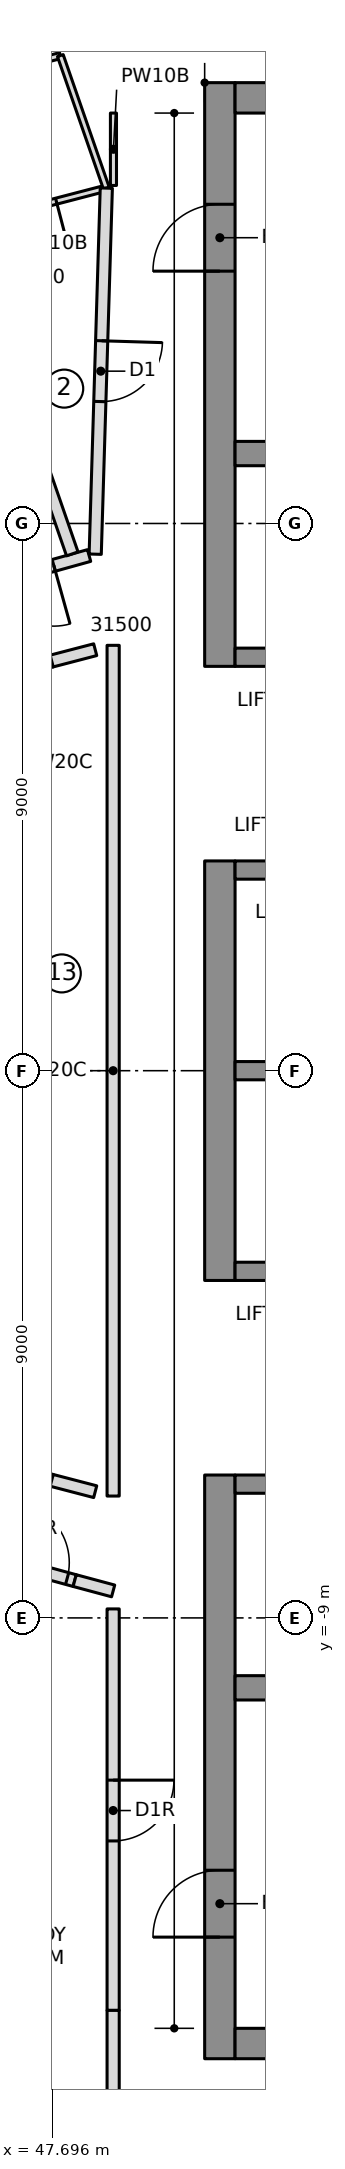
"""IFC4 building model, lengths in metres.
Left out: names, types, materials, properties, quantities, classifications, styles, units other than length and angle.
Written with IfcOpenShell. Run it as: python <this file> out.ifc"""

import sys

from ifc_helpers import new_model, si_unit, direction, frame, frame_2d, origin, place, context, subcontext, project, spatial, rectangle, extrude, element, fill, save


model = new_model("IFC4")
c1 = context("Model", 3, precision=1e-05, world=origin(), true_north=direction((0.0, 1.0)))
c2 = subcontext(c1, "Body", "Model", "MODEL_VIEW")
j1 = project(units=[si_unit("LENGTHUNIT", "METRE"), si_unit("PLANEANGLEUNIT", "RADIAN")], contexts=[c1])
p1 = place(None, origin())
s1 = spatial("IfcSite", under=j1, at=p1, CompositionType="ELEMENT")
p2 = place(p1, origin())
s2 = spatial("IfcBuilding", under=s1, at=p2, CompositionType="ELEMENT")
p3 = place(p2, frame((0.0, 0.0, 296.3)))
s3 = spatial("IfcBuildingStorey", under=s2, at=p3, CompositionType="ELEMENT", Elevation=296.3)
p4 = place(p3, frame((50.45, 6.65, 0.0), z_axis=(0.0, 0.0, 1.0), x_axis=(0.0, 1.0, 0.0)))
e1 = element("IfcWall", 1, at=p4, inside=s3, PredefinedType="SHEAR", context=c2, shape_type="SweptSolid", body=[
    extrude(rectangle(XDim=9.6, YDim=0.5, at=frame_2d((4.8, 0.0))), origin(), (0.0, 0.0, 1.0), 3.55),
])
p5 = place(p4, frame((6.5, 0.0, 0.0)))
e2 = element("IfcOpeningElement", 2, at=p5, cuts=e1, PredefinedType="OPENING", context=c2, shape_type="SweptSolid", body=[
    extrude(rectangle(XDim=1.1, YDim=2.1, at=frame_2d((0.55, 1.05))), frame((0.0, 0.26, 0.0), z_axis=(0.0, -1.0, 0.0), x_axis=(1.0, 0.0, 0.0)), (0.0, 0.0, 1.0), 0.52),
])
p6 = place(p3, frame((50.45, -3.45, 0.0), z_axis=(0.0, 0.0, 1.0), x_axis=(0.0, 1.0, 0.0)))
e3 = element("IfcWall", 3, at=p6, inside=s3, PredefinedType="SHEAR", context=c2, shape_type="SweptSolid", body=[
    extrude(rectangle(XDim=6.9, YDim=0.5, at=frame_2d((3.45, 0.0))), origin(), (0.0, 0.0, 1.0), 3.55),
])
p7 = place(p3, frame((50.45, -16.25, 0.0), z_axis=(0.0, 0.0, 1.0), x_axis=(0.0, 1.0, 0.0)))
e4 = element("IfcWall", 4, at=p7, inside=s3, PredefinedType="SHEAR", context=c2, shape_type="SweptSolid", body=[
    extrude(rectangle(XDim=9.6, YDim=0.5, at=frame_2d((4.8, 0.0))), origin(), (0.0, 0.0, 1.0), 3.55),
])
p8 = place(p7, frame((2.0, 0.0, 0.0)))
e5 = element("IfcOpeningElement", 5, at=p8, cuts=e4, PredefinedType="OPENING", context=c2, shape_type="SweptSolid", body=[
    extrude(rectangle(XDim=1.1, YDim=2.1, at=frame_2d((0.55, 1.05))), frame((0.0, 0.26, 0.0), z_axis=(0.0, -1.0, 0.0), x_axis=(1.0, 0.0, 0.0)), (0.0, 0.0, 1.0), 0.52),
])
for number, where, z_axis, x_axis in (
    (6, (50.7, 16.0, 0.0), (0.0, 0.0, 1.0), (1.0, 0.0, 0.0)),
    (7, (50.7, -16.0, 0.0), (0.0, 0.0, 1.0), (1.0, 0.0, 0.0)),
):
    element("IfcWall", number, at=place(p3, frame(where, z_axis=z_axis, x_axis=x_axis)), inside=s3, PredefinedType="SHEAR", context=c2, shape_type="SweptSolid", body=[
        extrude(rectangle(XDim=13.52, YDim=0.5, at=frame_2d((6.76, 0.0))), origin(), (0.0, 0.0, 1.0), 3.55),
    ])
p9 = place(p3, frame((50.7, 10.15, 0.0), z_axis=(0.0, 0.0, 1.0), x_axis=(1.0, 0.0, 0.0)))
e8 = element("IfcWall", 8, at=p9, inside=s3, PredefinedType="SHEAR", context=c2, shape_type="SweptSolid", body=[
    extrude(rectangle(XDim=13.02, YDim=0.4, at=frame_2d((6.51, 0.0))), origin(), (0.0, 0.0, 1.0), 3.55),
])
p10 = place(p9, frame((0.7, 0.0, 0.0)))
e9 = element("IfcOpeningElement", 9, at=p10, cuts=e8, PredefinedType="OPENING", context=c2, shape_type="SweptSolid", body=[
    extrude(rectangle(XDim=1.1, YDim=2.1, at=frame_2d((0.55, 1.05))), frame((0.0, 0.21, 0.0), z_axis=(0.0, -1.0, 0.0), x_axis=(1.0, 0.0, 0.0)), (0.0, 0.0, 1.0), 0.42),
])
p11 = place(p9, frame((3.5, 0.0, 0.0)))
e10 = element("IfcOpeningElement", 10, at=p11, cuts=e8, PredefinedType="OPENING", context=c2, shape_type="SweptSolid", body=[
    extrude(rectangle(XDim=1.1, YDim=2.1, at=frame_2d((0.55, 1.05))), frame((0.0, 0.21, 0.0), z_axis=(0.0, -1.0, 0.0), x_axis=(1.0, 0.0, 0.0)), (0.0, 0.0, 1.0), 0.42),
])
p12 = place(p3, frame((50.7, -10.15, 0.0), z_axis=(0.0, 0.0, 1.0), x_axis=(1.0, 0.0, 0.0)))
e11 = element("IfcWall", 11, at=p12, inside=s3, PredefinedType="SHEAR", context=c2, shape_type="SweptSolid", body=[
    extrude(rectangle(XDim=13.02, YDim=0.4, at=frame_2d((6.51, 0.0))), origin(), (0.0, 0.0, 1.0), 3.55),
])
p13 = place(p3, frame((50.7, 0.0, 0.0), z_axis=(0.0, 0.0, 1.0), x_axis=(1.0, 0.0, 0.0)))
e12 = element("IfcWall", 12, at=p13, inside=s3, PredefinedType="SHEAR", context=c2, shape_type="SweptSolid", body=[
    extrude(rectangle(XDim=10.9, YDim=0.3, at=frame_2d((5.45, 0.0))), origin(), (0.0, 0.0, 1.0), 3.55),
])
p14 = place(p3, frame((50.7, 3.3, 0.0), z_axis=(0.0, 0.0, 1.0), x_axis=(1.0, 0.0, 0.0)))
e13 = element("IfcWall", 13, at=p14, inside=s3, PredefinedType="SHEAR", context=c2, shape_type="SweptSolid", body=[
    extrude(rectangle(XDim=10.9, YDim=0.3, at=frame_2d((5.45, 0.0))), origin(), (0.0, 0.0, 1.0), 3.55),
])
p15 = place(p14, frame((0.7, 0.0, 0.0)))
e14 = element("IfcOpeningElement", 14, at=p15, cuts=e13, PredefinedType="OPENING", context=c2, shape_type="SweptSolid", body=[
    extrude(rectangle(XDim=1.1, YDim=2.1, at=frame_2d((0.55, 1.05))), frame((0.0, 0.16, 0.0), z_axis=(0.0, -1.0, 0.0), x_axis=(1.0, 0.0, 0.0)), (0.0, 0.0, 1.0), 0.32),
])
p16 = place(p14, frame((3.5, 0.0, 0.0)))
e15 = element("IfcOpeningElement", 15, at=p16, cuts=e13, PredefinedType="OPENING", context=c2, shape_type="SweptSolid", body=[
    extrude(rectangle(XDim=1.1, YDim=2.1, at=frame_2d((0.55, 1.05))), frame((0.0, 0.16, 0.0), z_axis=(0.0, -1.0, 0.0), x_axis=(1.0, 0.0, 0.0)), (0.0, 0.0, 1.0), 0.32),
])
p17 = place(p14, frame((6.4, 0.0, 0.0)))
e16 = element("IfcOpeningElement", 16, at=p17, cuts=e13, PredefinedType="OPENING", context=c2, shape_type="SweptSolid", body=[
    extrude(rectangle(XDim=0.9, YDim=2.1, at=frame_2d((0.45, 1.05))), frame((0.0, 0.16, 0.0), z_axis=(0.0, -1.0, 0.0), x_axis=(1.0, 0.0, 0.0)), (0.0, 0.0, 1.0), 0.32),
])
p18 = place(p14, frame((9.2, 0.0, 0.0)))
e17 = element("IfcOpeningElement", 17, at=p18, cuts=e13, PredefinedType="OPENING", context=c2, shape_type="SweptSolid", body=[
    extrude(rectangle(XDim=0.9, YDim=2.1, at=frame_2d((0.45, 1.05))), frame((0.0, 0.16, 0.0), z_axis=(0.0, -1.0, 0.0), x_axis=(1.0, 0.0, 0.0)), (0.0, 0.0, 1.0), 0.32),
])
p19 = place(p3, frame((50.7, 6.8, 0.0), z_axis=(0.0, 0.0, 1.0), x_axis=(1.0, 0.0, 0.0)))
e18 = element("IfcWall", 18, at=p19, inside=s3, PredefinedType="SHEAR", context=c2, shape_type="SweptSolid", body=[
    extrude(rectangle(XDim=10.9, YDim=0.3, at=frame_2d((5.45, 0.0))), origin(), (0.0, 0.0, 1.0), 3.55),
])
p20 = place(p19, frame((6.4, 0.0, 0.0)))
e19 = element("IfcOpeningElement", 19, at=p20, cuts=e18, PredefinedType="OPENING", context=c2, shape_type="SweptSolid", body=[
    extrude(rectangle(XDim=0.9, YDim=2.1, at=frame_2d((0.45, 1.05))), frame((0.0, 0.16, 0.0), z_axis=(0.0, -1.0, 0.0), x_axis=(1.0, 0.0, 0.0)), (0.0, 0.0, 1.0), 0.32),
])
p21 = place(p19, frame((9.2, 0.0, 0.0)))
e20 = element("IfcOpeningElement", 20, at=p21, cuts=e18, PredefinedType="OPENING", context=c2, shape_type="SweptSolid", body=[
    extrude(rectangle(XDim=0.9, YDim=2.1, at=frame_2d((0.45, 1.05))), frame((0.0, 0.16, 0.0), z_axis=(0.0, -1.0, 0.0), x_axis=(1.0, 0.0, 0.0)), (0.0, 0.0, 1.0), 0.32),
])
p22 = place(p3, frame((50.7, -3.3, 0.0), z_axis=(0.0, 0.0, 1.0), x_axis=(1.0, 0.0, 0.0)))
e21 = element("IfcWall", 21, at=p22, inside=s3, PredefinedType="SHEAR", context=c2, shape_type="SweptSolid", body=[
    extrude(rectangle(XDim=10.9, YDim=0.3, at=frame_2d((5.45, 0.0))), origin(), (0.0, 0.0, 1.0), 3.55),
])
p23 = place(p22, frame((9.1, 0.0, 0.0)))
e22 = element("IfcOpeningElement", 22, at=p23, cuts=e21, PredefinedType="OPENING", context=c2, shape_type="SweptSolid", body=[
    extrude(rectangle(XDim=1.1, YDim=2.1, at=frame_2d((0.55, 1.05))), frame((0.0, 0.16, 0.0), z_axis=(0.0, -1.0, 0.0), x_axis=(1.0, 0.0, 0.0)), (0.0, 0.0, 1.0), 0.32),
])
p24 = place(p3, frame((50.7, -6.8, 0.0), z_axis=(0.0, 0.0, 1.0), x_axis=(1.0, 0.0, 0.0)))
e23 = element("IfcWall", 23, at=p24, inside=s3, PredefinedType="SHEAR", context=c2, shape_type="SweptSolid", body=[
    extrude(rectangle(XDim=10.9, YDim=0.3, at=frame_2d((5.45, 0.0))), origin(), (0.0, 0.0, 1.0), 3.55),
])
p25 = place(p24, frame((6.3, 0.0, 0.0)))
e24 = element("IfcOpeningElement", 24, at=p25, cuts=e23, PredefinedType="OPENING", context=c2, shape_type="SweptSolid", body=[
    extrude(rectangle(XDim=1.1, YDim=2.1, at=frame_2d((0.55, 1.05))), frame((0.0, 0.16, 0.0), z_axis=(0.0, -1.0, 0.0), x_axis=(1.0, 0.0, 0.0)), (0.0, 0.0, 1.0), 0.32),
])
p26 = place(p24, frame((9.1, 0.0, 0.0)))
e25 = element("IfcOpeningElement", 25, at=p26, cuts=e23, PredefinedType="OPENING", context=c2, shape_type="SweptSolid", body=[
    extrude(rectangle(XDim=1.1, YDim=2.1, at=frame_2d((0.55, 1.05))), frame((0.0, 0.16, 0.0), z_axis=(0.0, -1.0, 0.0), x_axis=(1.0, 0.0, 0.0)), (0.0, 0.0, 1.0), 0.32),
])
p27 = place(p24, frame((0.8, 0.0, 0.0)))
e26 = element("IfcOpeningElement", 26, at=p27, cuts=e23, PredefinedType="OPENING", context=c2, shape_type="SweptSolid", body=[
    extrude(rectangle(XDim=0.9, YDim=2.1, at=frame_2d((0.45, 1.05))), frame((0.0, 0.16, 0.0), z_axis=(0.0, -1.0, 0.0), x_axis=(1.0, 0.0, 0.0)), (0.0, 0.0, 1.0), 0.32),
])
p28 = place(p24, frame((3.6, 0.0, 0.0)))
e27 = element("IfcOpeningElement", 27, at=p28, cuts=e23, PredefinedType="OPENING", context=c2, shape_type="SweptSolid", body=[
    extrude(rectangle(XDim=0.9, YDim=2.1, at=frame_2d((0.45, 1.05))), frame((0.0, 0.16, 0.0), z_axis=(0.0, -1.0, 0.0), x_axis=(1.0, 0.0, 0.0)), (0.0, 0.0, 1.0), 0.32),
])
p29 = place(p3, frame((48.299, 8.473, 0.0), z_axis=(0.0, 0.0, 1.0), x_axis=(-0.96343417102, -0.267945140115, 0.0)))
e28 = element("IfcWall", 28, at=p29, inside=s3, PredefinedType="PARTITIONING", context=c2, shape_type="SweptSolid", body=[
    extrude(rectangle(XDim=4.43, YDim=0.2, at=frame_2d((2.215, 0.0))), origin(), (0.0, 0.0, 1.0), 3.25),
])
p30 = place(p29, frame((0.603, 0.0, 0.0)))
e29 = element("IfcOpeningElement", 29, at=p30, cuts=e28, PredefinedType="OPENING", context=c2, shape_type="SweptSolid", body=[
    extrude(rectangle(XDim=1.0, YDim=2.1, at=frame_2d((0.5, 1.05))), frame((0.0, 0.11, 0.0), z_axis=(0.0, -1.0, 0.0), x_axis=(1.0, 0.0, 0.0)), (0.0, 0.0, 1.0), 0.22),
])
p31 = place(p3, frame((48.023, 8.5, 0.0), z_axis=(0.0, 0.0, 1.0), x_axis=(-0.327705598625, 0.944779890043, 0.0)))
e30 = element("IfcWall", 30, at=p31, inside=s3, PredefinedType="PARTITIONING", context=c2, shape_type="SweptSolid", body=[
    extrude(rectangle(XDim=9.61, YDim=0.2, at=frame_2d((4.805, 0.0))), origin(), (0.0, 0.0, 1.0), 3.25),
])
p32 = place(p3, frame((48.583, 14.516, 0.0), z_axis=(0.0, 0.0, 1.0), x_axis=(-0.967665843663, -0.252235633897, 0.0)))
e31 = element("IfcWall", 31, at=p32, inside=s3, PredefinedType="PARTITIONING", context=c2, shape_type="SweptSolid", body=[
    extrude(rectangle(XDim=2.508, YDim=0.1, at=frame_2d((1.254, 0.0))), origin(), (0.0, 0.0, 1.0), 3.25),
])
p33 = place(p32, frame((0.85, 0.0, 0.0)))
e32 = element("IfcOpeningElement", 32, at=p33, cuts=e31, PredefinedType="OPENING", context=c2, shape_type="SweptSolid", body=[
    extrude(rectangle(XDim=0.8, YDim=2.1, at=frame_2d((0.4, 1.05))), frame((0.0, 0.06, 0.0), z_axis=(0.0, -1.0, 0.0), x_axis=(1.0, 0.0, 0.0)), (0.0, 0.0, 1.0), 0.12),
])
p34 = place(p3, frame((45.955, 16.208, 0.0), z_axis=(0.0, 0.0, 1.0), x_axis=(0.967650770907, 0.25229345129, 0.0)))
e33 = element("IfcWall", 33, at=p34, inside=s3, PredefinedType="PARTITIONING", context=c2, shape_type="SweptSolid", body=[
    extrude(rectangle(XDim=1.934, YDim=0.1, at=frame_2d((0.967, 0.0))), origin(), (0.0, 0.0, 1.0), 3.25),
])
p35 = place(p3, frame((47.826, 16.696, 0.0), z_axis=(0.0, 0.0, 1.0), x_axis=(0.327695604762, -0.944783356447, 0.0)))
e34 = element("IfcWall", 34, at=p35, inside=s3, PredefinedType="PARTITIONING", context=c2, shape_type="SweptSolid", body=[
    extrude(rectangle(XDim=2.307, YDim=0.1, at=frame_2d((1.154, 0.0))), origin(), (0.0, 0.0, 1.0), 3.25),
])
p36 = place(p3, frame((44.031, -7.286, 0.0), z_axis=(0.0, 0.0, 1.0), x_axis=(0.964708521199, -0.263320088726, 0.0)))
e35 = element("IfcWall", 35, at=p36, inside=s3, PredefinedType="PARTITIONING", context=c2, shape_type="SweptSolid", body=[
    extrude(rectangle(XDim=4.179, YDim=0.2, at=frame_2d((2.089, 0.0))), origin(), (0.0, 0.0, 1.0), 3.25),
])
p37 = place(p36, frame((3.05, 0.0, 0.0)))
e36 = element("IfcOpeningElement", 36, at=p37, cuts=e35, PredefinedType="OPENING", context=c2, shape_type="SweptSolid", body=[
    extrude(rectangle(XDim=1.0, YDim=2.1, at=frame_2d((0.5, 1.05))), frame((0.0, 0.11, 0.0), z_axis=(0.0, -1.0, 0.0), x_axis=(1.0, 0.0, 0.0)), (0.0, 0.0, 1.0), 0.22),
])
p38 = place(p3, frame((43.918, 5.675, 0.0), z_axis=(0.0, 0.0, 1.0), x_axis=(0.962411212211, 0.271596499628, 0.0)))
e37 = element("IfcWall", 37, at=p38, inside=s3, PredefinedType="PARTITIONING", context=c2, shape_type="SweptSolid", body=[
    extrude(rectangle(XDim=3.913, YDim=0.2, at=frame_2d((1.957, 0.0))), origin(), (0.0, 0.0, 1.0), 3.25),
])
p39 = place(p38, frame((1.457, 0.0, 0.0)))
e38 = element("IfcOpeningElement", 38, at=p39, cuts=e37, PredefinedType="OPENING", context=c2, shape_type="SweptSolid", body=[
    extrude(rectangle(XDim=1.5, YDim=2.1, at=frame_2d((0.75, 1.05))), frame((0.0, 0.11, 0.0), z_axis=(0.0, -1.0, 0.0), x_axis=(1.0, 0.0, 0.0)), (0.0, 0.0, 1.0), 0.22),
])
p40 = place(p3, frame((47.684, -6.738, 0.0), z_axis=(0.0, 0.0, 1.0), x_axis=(-0.962411212211, 0.271596499628, 0.0)))
e39 = element("IfcWall", 39, at=p40, inside=s3, PredefinedType="PARTITIONING", context=c2, shape_type="SweptSolid", body=[
    extrude(rectangle(XDim=3.913, YDim=0.2, at=frame_2d((1.957, 0.0))), origin(), (0.0, 0.0, 1.0), 3.25),
])
for number, where, z_axis, x_axis in (
    (40, (47.684, 6.738, 0.0), (0.0, 0.0, 1.0), (0.968, 0.253, 0.0)),
    (41, (48.4, -6.924, 0.0), (0.0, 0.0, 1.0), (-0.968, 0.253, 0.0)),
):
    element("IfcWall", number, at=place(p3, frame(where, z_axis=z_axis, x_axis=x_axis)), inside=s3, PredefinedType="PARTITIONING", context=c2, shape_type="SweptSolid", body=[
        extrude(rectangle(XDim=0.74, YDim=0.2, at=frame_2d((0.37, 0.0))), origin(), (0.0, 0.0, 1.0), 3.25),
    ])
p41 = place(p3, frame((48.695, -8.852, 0.0), z_axis=(0.0, 0.0, 1.0), x_axis=(0.0, -1.0, 0.0)))
e42 = element("IfcWall", 42, at=p41, inside=s3, PredefinedType="PARTITIONING", context=c2, shape_type="SweptSolid", body=[
    extrude(rectangle(XDim=6.603, YDim=0.2, at=frame_2d((3.302, 0.0))), origin(), (0.0, 0.0, 1.0), 3.25),
])
p42 = place(p41, frame((2.816, 0.0, 0.0)))
e43 = element("IfcOpeningElement", 43, at=p42, cuts=e42, PredefinedType="OPENING", context=c2, shape_type="SweptSolid", body=[
    extrude(rectangle(XDim=1.0, YDim=2.1, at=frame_2d((0.5, 1.05))), frame((0.0, 0.11, 0.0), z_axis=(0.0, -1.0, 0.0), x_axis=(1.0, 0.0, 0.0)), (0.0, 0.0, 1.0), 0.22),
])
p43 = place(p3, frame((48.583, 14.516, 0.0), z_axis=(0.0, 0.0, 1.0), x_axis=(-0.030318578026, -0.999540286245, 0.0)))
e44 = element("IfcWall", 44, at=p43, inside=s3, PredefinedType="PARTITIONING", context=c2, shape_type="SweptSolid", body=[
    extrude(rectangle(XDim=6.023, YDim=0.2, at=frame_2d((3.012, 0.0))), origin(), (0.0, 0.0, 1.0), 3.25),
])
p44 = place(p43, frame((2.512, 0.0, 0.0)))
e45 = element("IfcOpeningElement", 45, at=p44, cuts=e44, PredefinedType="OPENING", context=c2, shape_type="SweptSolid", body=[
    extrude(rectangle(XDim=1.0, YDim=2.1, at=frame_2d((0.5, 1.05))), frame((0.0, 0.11, 0.0), z_axis=(0.0, -1.0, 0.0), x_axis=(1.0, 0.0, 0.0)), (0.0, 0.0, 1.0), 0.22),
])
p45 = place(p3, frame((48.695, 6.996, 0.0), z_axis=(0.0, 0.0, 1.0), x_axis=(0.0, -1.0, 0.0)))
e46 = element("IfcWall", 46, at=p45, inside=s3, PredefinedType="PARTITIONING", context=c2, shape_type="SweptSolid", body=[
    extrude(rectangle(XDim=13.992, YDim=0.2, at=frame_2d((6.996, 0.0))), origin(), (0.0, 0.0, 1.0), 3.25),
])
p46 = place(p3, frame((48.062, -8.386, 0.0), z_axis=(0.0, 0.0, 1.0), x_axis=(0.965669715173, -0.259772980114, 0.0)))
e47 = element("IfcWall", 47, at=p46, inside=s3, PredefinedType="PARTITIONING", context=c2, shape_type="SweptSolid", body=[
    extrude(rectangle(XDim=0.655, YDim=0.2, at=frame_2d((0.328, 0.0))), origin(), (0.0, 0.0, 1.0), 3.25),
])
p47 = place(p3, frame((48.695, -15.455, 0.0), z_axis=(0.0, 0.0, 1.0), x_axis=(0.0, -1.0, 0.0)))
e48 = element("IfcWall", 48, at=p47, inside=s3, PredefinedType="PARTITIONING", context=c2, shape_type="SweptSolid", body=[
    extrude(rectangle(XDim=3.098, YDim=0.2, at=frame_2d((1.549, 0.0))), origin(), (0.0, 0.0, 1.0), 3.25),
])
p48 = place(p3, frame((48.7, 14.559, 0.0), z_axis=(0.0, 0.0, 1.0), x_axis=(0.0, 1.0, 0.0)))
e49 = element("IfcWall", 49, at=p48, inside=s3, PredefinedType="PARTITIONING", context=c2, shape_type="SweptSolid", body=[
    extrude(rectangle(XDim=1.191, YDim=0.1, at=frame_2d((0.595, 0.0))), origin(), (0.0, 0.0, 1.0), 3.25),
])
p49 = place(p30, origin())
e50 = element("IfcDoor", 50, at=p49, inside=s3, OperationType="SINGLE_SWING_LEFT", PredefinedType="DOOR", context=c2, shape_type="SweptSolid", body=[
    extrude(rectangle(XDim=1.0, YDim=2.1, at=frame_2d((0.5, 1.05))), frame((0.0, 0.025, 0.0), z_axis=(0.0, -1.0, 0.0), x_axis=(1.0, 0.0, 0.0)), (0.0, 0.0, 1.0), 0.05),
])
fill(e29, e50)
p50 = place(p33, origin())
e51 = element("IfcDoor", 51, at=p50, inside=s3, OperationType="SINGLE_SWING_LEFT", PredefinedType="DOOR", context=c2, shape_type="SweptSolid", body=[
    extrude(rectangle(XDim=0.8, YDim=2.1, at=frame_2d((0.4, 1.05))), frame((0.0, 0.025, 0.0), z_axis=(0.0, -1.0, 0.0), x_axis=(1.0, 0.0, 0.0)), (0.0, 0.0, 1.0), 0.05),
])
fill(e32, e51)
p51 = place(p37, origin())
e52 = element("IfcDoor", 52, at=p51, inside=s3, OperationType="SINGLE_SWING_RIGHT", PredefinedType="DOOR", context=c2, shape_type="SweptSolid", body=[
    extrude(rectangle(XDim=1.0, YDim=2.1, at=frame_2d((0.5, 1.05))), frame((0.0, 0.025, 0.0), z_axis=(0.0, -1.0, 0.0), x_axis=(1.0, 0.0, 0.0)), (0.0, 0.0, 1.0), 0.05),
])
fill(e36, e52)
p52 = place(p42, origin())
e53 = element("IfcDoor", 53, at=p52, inside=s3, OperationType="SINGLE_SWING_RIGHT", PredefinedType="DOOR", context=c2, shape_type="SweptSolid", body=[
    extrude(rectangle(XDim=1.0, YDim=2.1, at=frame_2d((0.5, 1.05))), frame((0.0, 0.025, 0.0), z_axis=(0.0, -1.0, 0.0), x_axis=(1.0, 0.0, 0.0)), (0.0, 0.0, 1.0), 0.05),
])
fill(e43, e53)
p53 = place(p44, origin())
e54 = element("IfcDoor", 54, at=p53, inside=s3, OperationType="SINGLE_SWING_LEFT", PredefinedType="DOOR", context=c2, shape_type="SweptSolid", body=[
    extrude(rectangle(XDim=1.0, YDim=2.1, at=frame_2d((0.5, 1.05))), frame((0.0, 0.025, 0.0), z_axis=(0.0, -1.0, 0.0), x_axis=(1.0, 0.0, 0.0)), (0.0, 0.0, 1.0), 0.05),
])
fill(e45, e54)
p54 = place(p5, origin())
e55 = element("IfcDoor", 55, at=p54, inside=s3, OperationType="SINGLE_SWING_RIGHT", PredefinedType="DOOR", context=c2, shape_type="SweptSolid", body=[
    extrude(rectangle(XDim=1.1, YDim=2.1, at=frame_2d((0.55, 1.05))), frame((0.0, 0.025, 0.0), z_axis=(0.0, -1.0, 0.0), x_axis=(1.0, 0.0, 0.0)), (0.0, 0.0, 1.0), 0.05),
])
fill(e2, e55)
p55 = place(p8, origin())
e56 = element("IfcDoor", 56, at=p55, inside=s3, OperationType="SINGLE_SWING_RIGHT", PredefinedType="DOOR", context=c2, shape_type="SweptSolid", body=[
    extrude(rectangle(XDim=1.1, YDim=2.1, at=frame_2d((0.55, 1.05))), frame((0.0, 0.025, 0.0), z_axis=(0.0, -1.0, 0.0), x_axis=(1.0, 0.0, 0.0)), (0.0, 0.0, 1.0), 0.05),
])
fill(e5, e56)
save(model, sys.argv[1])
